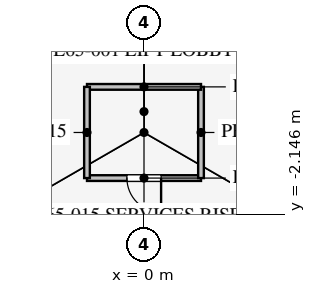
"""IFC4 building model, lengths in metres.
Left out: names, types, materials, properties, quantities, classifications, styles, units other than length and angle.
Written with IfcOpenShell. Run it as: python <this file> out.ifc"""

import sys

from ifc_helpers import new_model, si_unit, direction, frame, frame_2d, origin, place, context, subcontext, project, spatial, rectangle, extrude, element, fill, save


model = new_model("IFC4")
c1 = context("Model", 3, precision=1e-05, world=origin(), true_north=direction((0.0, 1.0)))
c2 = subcontext(c1, "Body", "Model", "MODEL_VIEW")
j1 = project(units=[si_unit("LENGTHUNIT", "METRE"), si_unit("PLANEANGLEUNIT", "RADIAN")], contexts=[c1])
p1 = place(None, origin())
s1 = spatial("IfcSite", under=j1, at=p1, CompositionType="ELEMENT")
p2 = place(p1, origin())
s2 = spatial("IfcBuilding", under=s1, at=p2, CompositionType="ELEMENT")
p3 = place(p2, frame((0.0, 0.0, 284.7)))
s3 = spatial("IfcBuildingStorey", under=s2, at=p3, CompositionType="ELEMENT", Elevation=284.7)
p4 = place(p3, frame((-1.5, -1.2, 0.0), z_axis=(0.0, 0.0, 1.0), x_axis=(1.0, 0.0, 0.0)))
e1 = element("IfcWall", 1, at=p4, inside=s3, PredefinedType="PARTITIONING", context=c2, shape_type="SweptSolid", body=[
    extrude(rectangle(XDim=3.0, YDim=0.15, at=frame_2d((1.5, 0.0))), origin(), (0.0, 0.0, 1.0), 4.0),
])
p5 = place(p4, frame((1.05, 0.0, 0.0)))
e2 = element("IfcOpeningElement", 2, at=p5, cuts=e1, PredefinedType="OPENING", context=c2, shape_type="SweptSolid", body=[
    extrude(rectangle(XDim=0.9, YDim=2.1, at=frame_2d((0.45, 1.05))), frame((0.0, 0.085, 0.0), z_axis=(0.0, -1.0, 0.0), x_axis=(1.0, 0.0, 0.0)), (0.0, 0.0, 1.0), 0.17),
])
p6 = place(p3, frame((1.5, -1.2, 0.0), z_axis=(0.0, 0.0, 1.0), x_axis=(0.0, 1.0, 0.0)))
e3 = element("IfcWall", 3, at=p6, inside=s3, PredefinedType="PARTITIONING", context=c2, shape_type="SweptSolid", body=[
    extrude(rectangle(XDim=2.4, YDim=0.15, at=frame_2d((1.2, 0.0))), origin(), (0.0, 0.0, 1.0), 4.0),
])
p7 = place(p3, frame((1.5, 1.2, 0.0), z_axis=(0.0, 0.0, 1.0), x_axis=(-1.0, 0.0, 0.0)))
e4 = element("IfcWall", 4, at=p7, inside=s3, PredefinedType="PARTITIONING", context=c2, shape_type="SweptSolid", body=[
    extrude(rectangle(XDim=3.0, YDim=0.15, at=frame_2d((1.5, 0.0))), origin(), (0.0, 0.0, 1.0), 4.0),
])
p8 = place(p3, frame((-1.5, 1.2, 0.0), z_axis=(0.0, 0.0, 1.0), x_axis=(0.0, -1.0, 0.0)))
e5 = element("IfcWall", 5, at=p8, inside=s3, PredefinedType="PARTITIONING", context=c2, shape_type="SweptSolid", body=[
    extrude(rectangle(XDim=2.4, YDim=0.15, at=frame_2d((1.2, 0.0))), origin(), (0.0, 0.0, 1.0), 4.0),
])
p9 = place(p3, frame((-0.49, 29.571, 0.0), z_axis=(0.0, 0.0, 1.0), x_axis=(-0.499999496503, -0.866025694478, 0.0)))
e6 = element("IfcWall", 6, at=p9, inside=s3, PredefinedType="PARTITIONING", context=c2, shape_type="SweptSolid", body=[
    extrude(rectangle(XDim=50.728, YDim=0.12, at=frame_2d((25.364, 0.0))), origin(), (0.0, 0.0, 1.0), 2.9),
])
p10 = place(p9, frame((9.8, 0.0, 0.15)))
e7 = element("IfcOpeningElement", 7, at=p10, cuts=e6, PredefinedType="OPENING", context=c2, shape_type="SweptSolid", body=[
    extrude(rectangle(XDim=1.8, YDim=2.1, at=frame_2d((0.9, 1.05))), frame((0.0, 0.07, 0.0), z_axis=(0.0, -1.0, 0.0), x_axis=(1.0, 0.0, 0.0)), (0.0, 0.0, 1.0), 0.14),
])
p11 = place(p9, frame((39.15, 0.0, 0.15)))
e8 = element("IfcOpeningElement", 8, at=p11, cuts=e6, PredefinedType="OPENING", context=c2, shape_type="SweptSolid", body=[
    extrude(rectangle(XDim=1.8, YDim=2.1, at=frame_2d((0.9, 1.05))), frame((0.0, 0.07, 0.0), z_axis=(0.0, -1.0, 0.0), x_axis=(1.0, 0.0, 0.0)), (0.0, 0.0, 1.0), 0.14),
])
p12 = place(p5, frame((0.9, 0.0, 0.0), z_axis=(0.0, 0.0, 1.0), x_axis=(-1.0, 0.0, 0.0)))
e9 = element("IfcDoor", 9, at=p12, inside=s3, OperationType="SINGLE_SWING_LEFT", PredefinedType="DOOR", context=c2, shape_type="SweptSolid", body=[
    extrude(rectangle(XDim=0.9, YDim=2.1, at=frame_2d((0.45, 1.05))), frame((0.0, 0.025, 0.0), z_axis=(0.0, -1.0, 0.0), x_axis=(1.0, 0.0, 0.0)), (0.0, 0.0, 1.0), 0.05),
])
fill(e2, e9)
save(model, sys.argv[1])
